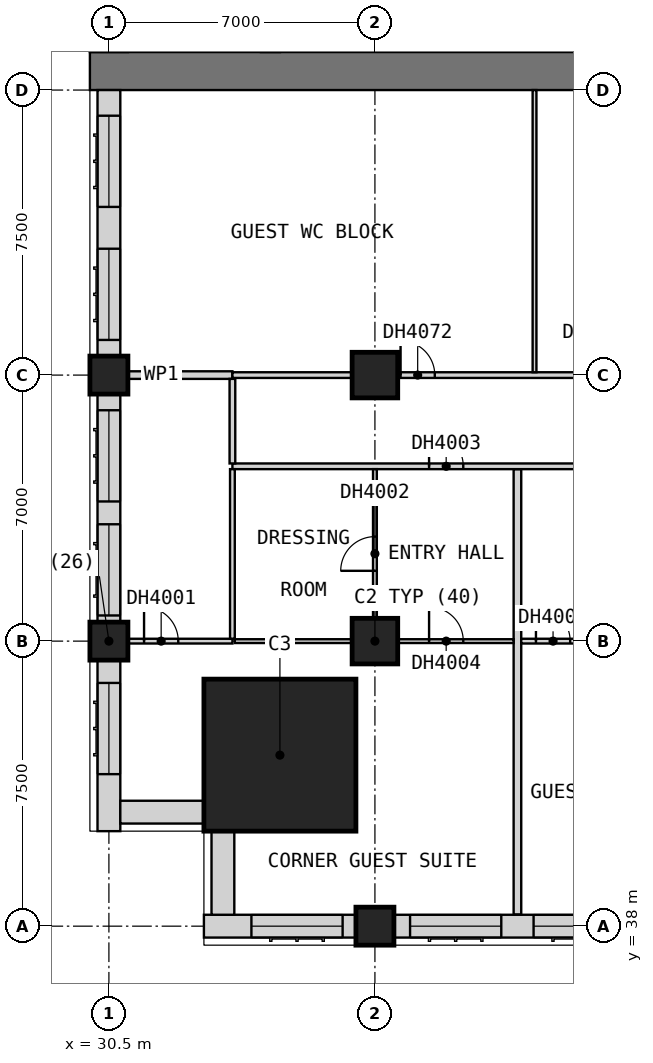
"""IFC4 building model, lengths in metres.
Left out: names, types, materials, properties, quantities, classifications, styles, units other than length and angle.
Written with IfcOpenShell. Run it as: python <this file> out.ifc"""

import sys

from ifc_helpers import new_model, si_unit, direction, frame, frame_2d, origin, origin_2d, place, context, subcontext, project, spatial, rectangle, extrude, element, fill, save


model = new_model("IFC4")
c1 = context("Model", 3, precision=1e-05, world=origin(), true_north=direction((0.0, 1.0)))
c2 = subcontext(c1, "Body", "Model", "MODEL_VIEW")
j1 = project(units=[si_unit("LENGTHUNIT", "METRE"), si_unit("PLANEANGLEUNIT", "RADIAN")], contexts=[c1])
p1 = place(None, origin())
s1 = spatial("IfcSite", under=j1, at=p1, CompositionType="ELEMENT")
p2 = place(p1, origin())
s2 = spatial("IfcBuilding", under=s1, at=p2, CompositionType="ELEMENT")
p3 = place(p2, frame((0.0, 0.0, 44.8)))
s3 = spatial("IfcBuildingStorey", under=s2, at=p3, CompositionType="ELEMENT", Elevation=44.8)
for number, where, z_axis, x_axis in (
    (1, (30.5, 45.5, 0.0), (0.0, 0.0, 1.0), (1.0, 0.0, 0.0)),
    (2, (30.5, 52.5, 0.0), (0.0, 0.0, 1.0), (1.0, 0.0, 0.0)),
    (3, (37.5, 38.0, 0.0), (0.0, 0.0, 1.0), (1.0, 0.0, 0.0)),
):
    element("IfcColumn", number, at=place(p3, frame(where, z_axis=z_axis, x_axis=x_axis)), inside=s3, PredefinedType="COLUMN", context=c2, shape_type="SweptSolid", body=[
        extrude(rectangle(XDim=1.0, YDim=1.0, at=origin_2d()), origin(), (0.0, 0.0, 1.0), 3.6),
    ])
for number, where, z_axis, x_axis in (
    (4, (37.5, 45.5, 0.0), (0.0, 0.0, 1.0), (1.0, 0.0, 0.0)),
    (5, (37.5, 52.5, 0.0), (0.0, 0.0, 1.0), (1.0, 0.0, 0.0)),
):
    element("IfcColumn", number, at=place(p3, frame(where, z_axis=z_axis, x_axis=x_axis)), inside=s3, PredefinedType="COLUMN", context=c2, shape_type="SweptSolid", body=[
        extrude(rectangle(XDim=1.2, YDim=1.2, at=origin_2d()), origin(), (0.0, 0.0, 1.0), 3.6),
    ])
p4 = place(p3, frame((35.0, 42.5, 0.0), z_axis=(0.0, 0.0, 1.0), x_axis=(1.0, 0.0, 0.0)))
e6 = element("IfcColumn", 6, at=p4, inside=s3, PredefinedType="COLUMN", context=c2, shape_type="SweptSolid", body=[
    extrude(rectangle(XDim=4.0, YDim=4.0, at=origin_2d()), origin(), (0.0, 0.0, 1.0), 3.6),
])
p5 = place(p3, frame((30.0, 60.5, 0.0), z_axis=(0.0, 0.0, 1.0), x_axis=(1.0, 0.0, 0.0)))
e7 = element("IfcWall", 7, at=p5, inside=s3, PredefinedType="SHEAR", context=c2, shape_type="SweptSolid", body=[
    extrude(rectangle(XDim=30.0, YDim=1.0, at=frame_2d((15.0, 0.0))), origin(), (0.0, 0.0, 1.0), 3.6),
])
p6 = place(p5, frame((21.9, 0.0, 0.0)))
e8 = element("IfcOpeningElement", 8, at=p6, cuts=e7, PredefinedType="OPENING", context=c2, shape_type="SweptSolid", body=[
    extrude(rectangle(XDim=1.8, YDim=2.1, at=frame_2d((0.9, 1.05))), frame((0.0, 0.51, 0.0), z_axis=(0.0, -1.0, 0.0), x_axis=(1.0, 0.0, 0.0)), (0.0, 0.0, 1.0), 1.02),
])
p7 = place(p5, frame((26.5, 0.0, 0.0)))
e9 = element("IfcOpeningElement", 9, at=p7, cuts=e7, PredefinedType="OPENING", context=c2, shape_type="SweptSolid", body=[
    extrude(rectangle(XDim=1.2, YDim=2.1, at=frame_2d((0.6, 1.05))), frame((0.0, 0.51, 0.0), z_axis=(0.0, -1.0, 0.0), x_axis=(1.0, 0.0, 0.0)), (0.0, 0.0, 1.0), 1.02),
])
p8 = place(p3, frame((33.0, 38.0, 0.0), z_axis=(0.0, 0.0, 1.0), x_axis=(1.0, 0.0, 0.0)))
e10 = element("IfcWall", 10, at=p8, inside=s3, PredefinedType="SOLIDWALL", context=c2, shape_type="SweptSolid", body=[
    extrude(rectangle(XDim=4.0, YDim=0.6, at=frame_2d((2.0, 0.0))), origin(), (0.0, 0.0, 1.0), 3.35),
])
p9 = place(p8, frame((1.25, 0.0, 0.8)))
e11 = element("IfcOpeningElement", 11, at=p9, cuts=e10, PredefinedType="OPENING", context=c2, shape_type="SweptSolid", body=[
    extrude(rectangle(XDim=2.4, YDim=1.8, at=frame_2d((1.2, 0.9))), frame((0.0, 0.31, 0.0), z_axis=(0.0, -1.0, 0.0), x_axis=(1.0, 0.0, 0.0)), (0.0, 0.0, 1.0), 0.62),
])
p10 = place(p3, frame((38.0, 38.0, 0.0), z_axis=(0.0, 0.0, 1.0), x_axis=(1.0, 0.0, 0.0)))
e12 = element("IfcWall", 12, at=p10, inside=s3, PredefinedType="SOLIDWALL", context=c2, shape_type="SweptSolid", body=[
    extrude(rectangle(XDim=6.5, YDim=0.6, at=frame_2d((3.25, 0.0))), origin(), (0.0, 0.0, 1.0), 2.85),
])
p11 = place(p10, frame((0.425, 0.0, 0.8)))
e13 = element("IfcOpeningElement", 13, at=p11, cuts=e12, PredefinedType="OPENING", context=c2, shape_type="SweptSolid", body=[
    extrude(rectangle(XDim=2.4, YDim=1.8, at=frame_2d((1.2, 0.9))), frame((0.0, 0.31, 0.0), z_axis=(0.0, -1.0, 0.0), x_axis=(1.0, 0.0, 0.0)), (0.0, 0.0, 1.0), 0.62),
])
p12 = place(p10, frame((3.675, 0.0, 0.8)))
e14 = element("IfcOpeningElement", 14, at=p12, cuts=e12, PredefinedType="OPENING", context=c2, shape_type="SweptSolid", body=[
    extrude(rectangle(XDim=2.4, YDim=1.8, at=frame_2d((1.2, 0.9))), frame((0.0, 0.31, 0.0), z_axis=(0.0, -1.0, 0.0), x_axis=(1.0, 0.0, 0.0)), (0.0, 0.0, 1.0), 0.62),
])
p13 = place(p3, frame((30.5, 60.0, 0.0), z_axis=(0.0, 0.0, 1.0), x_axis=(0.0, -1.0, 0.0)))
e15 = element("IfcWall", 15, at=p13, inside=s3, PredefinedType="SOLIDWALL", context=c2, shape_type="SweptSolid", body=[
    extrude(rectangle(XDim=7.0, YDim=0.6, at=frame_2d((3.5, 0.0))), origin(), (0.0, 0.0, 1.0), 3.35),
])
p14 = place(p13, frame((4.175, 0.0, 0.8)))
e16 = element("IfcOpeningElement", 16, at=p14, cuts=e15, PredefinedType="OPENING", context=c2, shape_type="SweptSolid", body=[
    extrude(rectangle(XDim=2.4, YDim=1.8, at=frame_2d((1.2, 0.9))), frame((0.0, 0.31, 0.0), z_axis=(0.0, -1.0, 0.0), x_axis=(1.0, 0.0, 0.0)), (0.0, 0.0, 1.0), 0.62),
])
p15 = place(p13, frame((0.675, 0.0, 0.8)))
e17 = element("IfcOpeningElement", 17, at=p15, cuts=e15, PredefinedType="OPENING", context=c2, shape_type="SweptSolid", body=[
    extrude(rectangle(XDim=2.4, YDim=1.8, at=frame_2d((1.2, 0.9))), frame((0.0, 0.31, 0.0), z_axis=(0.0, -1.0, 0.0), x_axis=(1.0, 0.0, 0.0)), (0.0, 0.0, 1.0), 0.62),
])
p16 = place(p3, frame((30.5, 52.0, 0.0), z_axis=(0.0, 0.0, 1.0), x_axis=(0.0, -1.0, 0.0)))
e18 = element("IfcWall", 18, at=p16, inside=s3, PredefinedType="SOLIDWALL", context=c2, shape_type="SweptSolid", body=[
    extrude(rectangle(XDim=6.0, YDim=0.6, at=frame_2d((3.0, 0.0))), origin(), (0.0, 0.0, 1.0), 2.85),
])
p17 = place(p16, frame((3.425, 0.0, 0.8)))
e19 = element("IfcOpeningElement", 19, at=p17, cuts=e18, PredefinedType="OPENING", context=c2, shape_type="SweptSolid", body=[
    extrude(rectangle(XDim=2.4, YDim=1.8, at=frame_2d((1.2, 0.9))), frame((0.0, 0.31, 0.0), z_axis=(0.0, -1.0, 0.0), x_axis=(1.0, 0.0, 0.0)), (0.0, 0.0, 1.0), 0.62),
])
p18 = place(p16, frame((0.425, 0.0, 0.8)))
e20 = element("IfcOpeningElement", 20, at=p18, cuts=e18, PredefinedType="OPENING", context=c2, shape_type="SweptSolid", body=[
    extrude(rectangle(XDim=2.4, YDim=1.8, at=frame_2d((1.2, 0.9))), frame((0.0, 0.31, 0.0), z_axis=(0.0, -1.0, 0.0), x_axis=(1.0, 0.0, 0.0)), (0.0, 0.0, 1.0), 0.62),
])
p19 = place(p3, frame((30.5, 45.0, 0.0), z_axis=(0.0, 0.0, 1.0), x_axis=(0.0, -1.0, 0.0)))
e21 = element("IfcWall", 21, at=p19, inside=s3, PredefinedType="SOLIDWALL", context=c2, shape_type="SweptSolid", body=[
    extrude(rectangle(XDim=4.5, YDim=0.6, at=frame_2d((2.25, 0.0))), origin(), (0.0, 0.0, 1.0), 3.35),
])
p20 = place(p19, frame((0.6, 0.0, 0.8)))
e22 = element("IfcOpeningElement", 22, at=p20, cuts=e21, PredefinedType="OPENING", context=c2, shape_type="SweptSolid", body=[
    extrude(rectangle(XDim=2.4, YDim=1.8, at=frame_2d((1.2, 0.9))), frame((0.0, 0.31, 0.0), z_axis=(0.0, -1.0, 0.0), x_axis=(1.0, 0.0, 0.0)), (0.0, 0.0, 1.0), 0.62),
])
for number, where, z_axis, x_axis in (
    (23, (30.8, 41.0, 0.0), (0.0, 0.0, 1.0), (1.0, 0.0, 0.0)),
    (24, (33.5, 40.5, 0.0), (0.0, 0.0, 1.0), (0.0, -1.0, 0.0)),
):
    element("IfcWall", number, at=place(p3, frame(where, z_axis=z_axis, x_axis=x_axis)), inside=s3, PredefinedType="SOLIDWALL", context=c2, shape_type="SweptSolid", body=[
        extrude(rectangle(XDim=2.2, YDim=0.6, at=frame_2d((1.1, 0.0))), origin(), (0.0, 0.0, 1.0), 3.35),
    ])
p21 = place(p3, frame((30.0, 52.5, 0.0), z_axis=(0.0, 0.0, 1.0), x_axis=(1.0, 0.0, 0.0)))
e25 = element("IfcWall", 25, at=p21, inside=s3, PredefinedType="PARTITIONING", context=c2, shape_type="SweptSolid", body=[
    extrude(rectangle(XDim=3.75, YDim=0.2, at=frame_2d((1.875, 0.0))), origin(), (0.0, 0.0, 1.0), 3.35),
])
p22 = place(p3, frame((41.25, 38.31, 0.0), z_axis=(0.0, 0.0, 1.0), x_axis=(0.0, 1.0, 0.0)))
e26 = element("IfcWall", 26, at=p22, inside=s3, PredefinedType="PARTITIONING", context=c2, shape_type="SweptSolid", body=[
    extrude(rectangle(XDim=11.715, YDim=0.2, at=frame_2d((5.857, 0.0))), origin(), (0.0, 0.0, 1.0), 3.35),
])
p23 = place(p3, frame((33.75, 50.1, 0.0), z_axis=(0.0, 0.0, 1.0), x_axis=(1.0, 0.0, 0.0)))
e27 = element("IfcWall", 27, at=p23, inside=s3, PredefinedType="PARTITIONING", context=c2, shape_type="SweptSolid", body=[
    extrude(rectangle(XDim=43.65, YDim=0.15, at=frame_2d((21.825, 0.0))), origin(), (0.0, 0.0, 1.0), 3.35),
])
p24 = place(p23, frame((5.175, 0.0, 0.0)))
e28 = element("IfcOpeningElement", 28, at=p24, cuts=e27, PredefinedType="OPENING", context=c2, shape_type="SweptSolid", body=[
    extrude(rectangle(XDim=0.9, YDim=2.1, at=frame_2d((0.45, 1.05))), frame((0.0, 0.085, 0.0), z_axis=(0.0, -1.0, 0.0), x_axis=(1.0, 0.0, 0.0)), (0.0, 0.0, 1.0), 0.17),
])
p25 = place(p23, frame((9.863, 0.0, 0.0)))
e29 = element("IfcOpeningElement", 29, at=p25, cuts=e27, PredefinedType="OPENING", context=c2, shape_type="SweptSolid", body=[
    extrude(rectangle(XDim=0.9, YDim=2.1, at=frame_2d((0.45, 1.05))), frame((0.0, 0.085, 0.0), z_axis=(0.0, -1.0, 0.0), x_axis=(1.0, 0.0, 0.0)), (0.0, 0.0, 1.0), 0.17),
])
p26 = place(p23, frame((16.938, 0.0, 0.0)))
e30 = element("IfcOpeningElement", 30, at=p26, cuts=e27, PredefinedType="OPENING", context=c2, shape_type="SweptSolid", body=[
    extrude(rectangle(XDim=1.0, YDim=2.1, at=frame_2d((0.5, 1.05))), frame((0.0, 0.085, 0.0), z_axis=(0.0, -1.0, 0.0), x_axis=(1.0, 0.0, 0.0)), (0.0, 0.0, 1.0), 0.17),
])
p27 = place(p23, frame((24.3, 0.0, 0.0)))
e31 = element("IfcOpeningElement", 31, at=p27, cuts=e27, PredefinedType="OPENING", context=c2, shape_type="SweptSolid", body=[
    extrude(rectangle(XDim=0.9, YDim=2.1, at=frame_2d((0.45, 1.05))), frame((0.0, 0.085, 0.0), z_axis=(0.0, -1.0, 0.0), x_axis=(1.0, 0.0, 0.0)), (0.0, 0.0, 1.0), 0.17),
])
p28 = place(p23, frame((31.938, 0.0, 0.0)))
e32 = element("IfcOpeningElement", 32, at=p28, cuts=e27, PredefinedType="OPENING", context=c2, shape_type="SweptSolid", body=[
    extrude(rectangle(XDim=1.0, YDim=2.1, at=frame_2d((0.5, 1.05))), frame((0.0, 0.085, 0.0), z_axis=(0.0, -1.0, 0.0), x_axis=(1.0, 0.0, 0.0)), (0.0, 0.0, 1.0), 0.17),
])
p29 = place(p23, frame((39.3, 0.0, 0.0)))
e33 = element("IfcOpeningElement", 33, at=p29, cuts=e27, PredefinedType="OPENING", context=c2, shape_type="SweptSolid", body=[
    extrude(rectangle(XDim=0.9, YDim=2.1, at=frame_2d((0.45, 1.05))), frame((0.0, 0.085, 0.0), z_axis=(0.0, -1.0, 0.0), x_axis=(1.0, 0.0, 0.0)), (0.0, 0.0, 1.0), 0.17),
])
p30 = place(p23, frame((42.0, 0.0, 0.0)))
e34 = element("IfcOpeningElement", 34, at=p30, cuts=e27, PredefinedType="OPENING", context=c2, shape_type="SweptSolid", body=[
    extrude(rectangle(XDim=0.9, YDim=2.1, at=frame_2d((0.45, 1.05))), frame((0.0, 0.085, 0.0), z_axis=(0.0, -1.0, 0.0), x_axis=(1.0, 0.0, 0.0)), (0.0, 0.0, 1.0), 0.17),
])
p31 = place(p3, frame((33.75, 52.5, 0.0), z_axis=(0.0, 0.0, 1.0), x_axis=(1.0, 0.0, 0.0)))
e35 = element("IfcWall", 35, at=p31, inside=s3, PredefinedType="PARTITIONING", context=c2, shape_type="SweptSolid", body=[
    extrude(rectangle(XDim=17.15, YDim=0.15, at=frame_2d((8.575, 0.0))), origin(), (0.0, 0.0, 1.0), 3.35),
])
p32 = place(p31, frame((4.425, 0.0, 0.0)))
e36 = element("IfcOpeningElement", 36, at=p32, cuts=e35, PredefinedType="OPENING", context=c2, shape_type="SweptSolid", body=[
    extrude(rectangle(XDim=0.9, YDim=2.1, at=frame_2d((0.45, 1.05))), frame((0.0, 0.085, 0.0), z_axis=(0.0, -1.0, 0.0), x_axis=(1.0, 0.0, 0.0)), (0.0, 0.0, 1.0), 0.17),
])
p33 = place(p31, frame((9.15, 0.0, 0.0)))
e37 = element("IfcOpeningElement", 37, at=p33, cuts=e35, PredefinedType="OPENING", context=c2, shape_type="SweptSolid", body=[
    extrude(rectangle(XDim=0.9, YDim=2.1, at=frame_2d((0.45, 1.05))), frame((0.0, 0.085, 0.0), z_axis=(0.0, -1.0, 0.0), x_axis=(1.0, 0.0, 0.0)), (0.0, 0.0, 1.0), 0.17),
])
p34 = place(p31, frame((12.675, 0.0, 0.0)))
e38 = element("IfcOpeningElement", 38, at=p34, cuts=e35, PredefinedType="OPENING", context=c2, shape_type="SweptSolid", body=[
    extrude(rectangle(XDim=0.9, YDim=2.1, at=frame_2d((0.45, 1.05))), frame((0.0, 0.085, 0.0), z_axis=(0.0, -1.0, 0.0), x_axis=(1.0, 0.0, 0.0)), (0.0, 0.0, 1.0), 0.17),
])
p35 = place(p31, frame((15.625, 0.0, 0.0)))
e39 = element("IfcOpeningElement", 39, at=p35, cuts=e35, PredefinedType="OPENING", context=c2, shape_type="SweptSolid", body=[
    extrude(rectangle(XDim=0.9, YDim=2.1, at=frame_2d((0.45, 1.05))), frame((0.0, 0.085, 0.0), z_axis=(0.0, -1.0, 0.0), x_axis=(1.0, 0.0, 0.0)), (0.0, 0.0, 1.0), 0.17),
])
p36 = place(p3, frame((33.75, 50.175, 0.0), z_axis=(0.0, 0.0, 1.0), x_axis=(0.0, 1.0, 0.0)))
e40 = element("IfcWall", 40, at=p36, inside=s3, PredefinedType="PARTITIONING", context=c2, shape_type="SweptSolid", body=[
    extrude(rectangle(XDim=2.225, YDim=0.15, at=frame_2d((1.112, 0.0))), origin(), (0.0, 0.0, 1.0), 3.35),
])
p37 = place(p3, frame((33.812, 45.5, 0.0), z_axis=(0.0, 0.0, 1.0), x_axis=(1.0, 0.0, 0.0)))
e41 = element("IfcWall", 41, at=p37, inside=s3, PredefinedType="PARTITIONING", context=c2, shape_type="SweptSolid", body=[
    extrude(rectangle(XDim=7.337, YDim=0.1, at=frame_2d((3.669, 0.0))), origin(), (0.0, 0.0, 1.0), 3.35),
])
p38 = place(p37, frame((5.113, 0.0, 0.0)))
e42 = element("IfcOpeningElement", 42, at=p38, cuts=e41, PredefinedType="OPENING", context=c2, shape_type="SweptSolid", body=[
    extrude(rectangle(XDim=0.9, YDim=2.1, at=frame_2d((0.45, 1.05))), frame((0.0, 0.06, 0.0), z_axis=(0.0, -1.0, 0.0), x_axis=(1.0, 0.0, 0.0)), (0.0, 0.0, 1.0), 0.12),
])
p39 = place(p3, frame((37.5, 45.55, 0.0), z_axis=(0.0, 0.0, 1.0), x_axis=(0.0, 1.0, 0.0)))
e43 = element("IfcWall", 43, at=p39, inside=s3, PredefinedType="PARTITIONING", context=c2, shape_type="SweptSolid", body=[
    extrude(rectangle(XDim=4.475, YDim=0.1, at=frame_2d((2.237, 0.0))), origin(), (0.0, 0.0, 1.0), 3.35),
])
p40 = place(p39, frame((1.8, 0.0, 0.0)))
e44 = element("IfcOpeningElement", 44, at=p40, cuts=e43, PredefinedType="OPENING", context=c2, shape_type="SweptSolid", body=[
    extrude(rectangle(XDim=0.9, YDim=2.1, at=frame_2d((0.45, 1.05))), frame((0.0, 0.06, 0.0), z_axis=(0.0, -1.0, 0.0), x_axis=(1.0, 0.0, 0.0)), (0.0, 0.0, 1.0), 0.12),
])
p41 = place(p3, frame((41.7, 52.575, 0.0), z_axis=(0.0, 0.0, 1.0), x_axis=(0.0, 1.0, 0.0)))
e45 = element("IfcWall", 45, at=p41, inside=s3, PredefinedType="PARTITIONING", context=c2, shape_type="SweptSolid", body=[
    extrude(rectangle(XDim=7.425, YDim=0.1, at=frame_2d((3.712, 0.0))), origin(), (0.0, 0.0, 1.0), 3.35),
])
p42 = place(p3, frame((30.0, 45.5, 0.0), z_axis=(0.0, 0.0, 1.0), x_axis=(1.0, 0.0, 0.0)))
e46 = element("IfcWall", 46, at=p42, inside=s3, PredefinedType="PARTITIONING", context=c2, shape_type="SweptSolid", body=[
    extrude(rectangle(XDim=3.75, YDim=0.125, at=frame_2d((1.875, 0.0))), origin(), (0.0, 0.0, 1.0), 3.35),
])
p43 = place(p42, frame((1.425, 0.0, 0.0)))
e47 = element("IfcOpeningElement", 47, at=p43, cuts=e46, PredefinedType="OPENING", context=c2, shape_type="SweptSolid", body=[
    extrude(rectangle(XDim=0.9, YDim=2.1, at=frame_2d((0.45, 1.05))), frame((0.0, 0.073, 0.0), z_axis=(0.0, -1.0, 0.0), x_axis=(1.0, 0.0, 0.0)), (0.0, 0.0, 1.0), 0.145),
])
p44 = place(p3, frame((41.35, 45.5, 0.0), z_axis=(0.0, 0.0, 1.0), x_axis=(1.0, 0.0, 0.0)))
e48 = element("IfcWall", 48, at=p44, inside=s3, PredefinedType="PARTITIONING", context=c2, shape_type="SweptSolid", body=[
    extrude(rectangle(XDim=1.775, YDim=0.125, at=frame_2d((0.887, 0.0))), origin(), (0.0, 0.0, 1.0), 3.35),
])
p45 = place(p44, frame((0.387, 0.0, 0.0)))
e49 = element("IfcOpeningElement", 49, at=p45, cuts=e48, PredefinedType="OPENING", context=c2, shape_type="SweptSolid", body=[
    extrude(rectangle(XDim=0.9, YDim=2.1, at=frame_2d((0.45, 1.05))), frame((0.0, 0.073, 0.0), z_axis=(0.0, -1.0, 0.0), x_axis=(1.0, 0.0, 0.0)), (0.0, 0.0, 1.0), 0.145),
])
p46 = place(p3, frame((33.75, 45.562, 0.0), z_axis=(0.0, 0.0, 1.0), x_axis=(0.0, 1.0, 0.0)))
e50 = element("IfcWall", 50, at=p46, inside=s3, PredefinedType="PARTITIONING", context=c2, shape_type="SweptSolid", body=[
    extrude(rectangle(XDim=4.462, YDim=0.125, at=frame_2d((2.231, 0.0))), origin(), (0.0, 0.0, 1.0), 3.35),
])
p47 = place(p9, origin())
e51 = element("IfcWindow", 51, at=p47, inside=s3, PartitioningType="SINGLE_PANEL", PredefinedType="WINDOW", context=c2, shape_type="SweptSolid", body=[
    extrude(rectangle(XDim=2.4, YDim=1.8, at=frame_2d((1.2, 0.9))), frame((0.0, -0.07, 0.0), z_axis=(0.0, -1.0, 0.0), x_axis=(1.0, 0.0, 0.0)), (0.0, 0.0, 1.0), 0.06),
])
fill(e11, e51)
p48 = place(p11, origin())
e52 = element("IfcWindow", 52, at=p48, inside=s3, PartitioningType="SINGLE_PANEL", PredefinedType="WINDOW", context=c2, shape_type="SweptSolid", body=[
    extrude(rectangle(XDim=2.4, YDim=1.8, at=frame_2d((1.2, 0.9))), frame((0.0, -0.07, 0.0), z_axis=(0.0, -1.0, 0.0), x_axis=(1.0, 0.0, 0.0)), (0.0, 0.0, 1.0), 0.06),
])
fill(e13, e52)
p49 = place(p12, origin())
e53 = element("IfcWindow", 53, at=p49, inside=s3, PartitioningType="SINGLE_PANEL", PredefinedType="WINDOW", context=c2, shape_type="SweptSolid", body=[
    extrude(rectangle(XDim=2.4, YDim=1.8, at=frame_2d((1.2, 0.9))), frame((0.0, -0.07, 0.0), z_axis=(0.0, -1.0, 0.0), x_axis=(1.0, 0.0, 0.0)), (0.0, 0.0, 1.0), 0.06),
])
fill(e14, e53)
p50 = place(p14, origin())
e54 = element("IfcWindow", 54, at=p50, inside=s3, PartitioningType="SINGLE_PANEL", PredefinedType="WINDOW", context=c2, shape_type="SweptSolid", body=[
    extrude(rectangle(XDim=2.4, YDim=1.8, at=frame_2d((1.2, 0.9))), frame((0.0, -0.07, 0.0), z_axis=(0.0, -1.0, 0.0), x_axis=(1.0, 0.0, 0.0)), (0.0, 0.0, 1.0), 0.06),
])
fill(e16, e54)
p51 = place(p15, origin())
e55 = element("IfcWindow", 55, at=p51, inside=s3, PartitioningType="SINGLE_PANEL", PredefinedType="WINDOW", context=c2, shape_type="SweptSolid", body=[
    extrude(rectangle(XDim=2.4, YDim=1.8, at=frame_2d((1.2, 0.9))), frame((0.0, -0.07, 0.0), z_axis=(0.0, -1.0, 0.0), x_axis=(1.0, 0.0, 0.0)), (0.0, 0.0, 1.0), 0.06),
])
fill(e17, e55)
p52 = place(p17, origin())
e56 = element("IfcWindow", 56, at=p52, inside=s3, PartitioningType="SINGLE_PANEL", PredefinedType="WINDOW", context=c2, shape_type="SweptSolid", body=[
    extrude(rectangle(XDim=2.4, YDim=1.8, at=frame_2d((1.2, 0.9))), frame((0.0, -0.07, 0.0), z_axis=(0.0, -1.0, 0.0), x_axis=(1.0, 0.0, 0.0)), (0.0, 0.0, 1.0), 0.06),
])
fill(e19, e56)
p53 = place(p18, origin())
e57 = element("IfcWindow", 57, at=p53, inside=s3, PartitioningType="SINGLE_PANEL", PredefinedType="WINDOW", context=c2, shape_type="SweptSolid", body=[
    extrude(rectangle(XDim=2.4, YDim=1.8, at=frame_2d((1.2, 0.9))), frame((0.0, -0.07, 0.0), z_axis=(0.0, -1.0, 0.0), x_axis=(1.0, 0.0, 0.0)), (0.0, 0.0, 1.0), 0.06),
])
fill(e20, e57)
p54 = place(p20, origin())
e58 = element("IfcWindow", 58, at=p54, inside=s3, PartitioningType="SINGLE_PANEL", PredefinedType="WINDOW", context=c2, shape_type="SweptSolid", body=[
    extrude(rectangle(XDim=2.4, YDim=1.8, at=frame_2d((1.2, 0.9))), frame((0.0, -0.07, 0.0), z_axis=(0.0, -1.0, 0.0), x_axis=(1.0, 0.0, 0.0)), (0.0, 0.0, 1.0), 0.06),
])
fill(e22, e58)
p55 = place(p43, origin())
e59 = element("IfcDoor", 59, at=p55, inside=s3, OperationType="SINGLE_SWING_LEFT", PredefinedType="DOOR", context=c2, shape_type="SweptSolid", body=[
    extrude(rectangle(XDim=0.9, YDim=2.1, at=frame_2d((0.45, 1.05))), frame((0.0, 0.025, 0.0), z_axis=(0.0, -1.0, 0.0), x_axis=(1.0, 0.0, 0.0)), (0.0, 0.0, 1.0), 0.05),
])
fill(e47, e59)
p56 = place(p40, origin())
e60 = element("IfcDoor", 60, at=p56, inside=s3, OperationType="SINGLE_SWING_RIGHT", PredefinedType="DOOR", context=c2, shape_type="SweptSolid", body=[
    extrude(rectangle(XDim=0.9, YDim=2.1, at=frame_2d((0.45, 1.05))), frame((0.0, 0.025, 0.0), z_axis=(0.0, -1.0, 0.0), x_axis=(1.0, 0.0, 0.0)), (0.0, 0.0, 1.0), 0.05),
])
fill(e44, e60)
p57 = place(p24, origin())
e61 = element("IfcDoor", 61, at=p57, inside=s3, OperationType="SINGLE_SWING_RIGHT", PredefinedType="DOOR", context=c2, shape_type="SweptSolid", body=[
    extrude(rectangle(XDim=0.9, YDim=2.1, at=frame_2d((0.45, 1.05))), frame((0.0, 0.025, 0.0), z_axis=(0.0, -1.0, 0.0), x_axis=(1.0, 0.0, 0.0)), (0.0, 0.0, 1.0), 0.05),
])
fill(e28, e61)
p58 = place(p38, origin())
e62 = element("IfcDoor", 62, at=p58, inside=s3, OperationType="SINGLE_SWING_LEFT", PredefinedType="DOOR", context=c2, shape_type="SweptSolid", body=[
    extrude(rectangle(XDim=0.9, YDim=2.1, at=frame_2d((0.45, 1.05))), frame((0.0, 0.025, 0.0), z_axis=(0.0, -1.0, 0.0), x_axis=(1.0, 0.0, 0.0)), (0.0, 0.0, 1.0), 0.05),
])
fill(e42, e62)
p59 = place(p45, origin())
e63 = element("IfcDoor", 63, at=p59, inside=s3, OperationType="SINGLE_SWING_LEFT", PredefinedType="DOOR", context=c2, shape_type="SweptSolid", body=[
    extrude(rectangle(XDim=0.9, YDim=2.1, at=frame_2d((0.45, 1.05))), frame((0.0, 0.025, 0.0), z_axis=(0.0, -1.0, 0.0), x_axis=(1.0, 0.0, 0.0)), (0.0, 0.0, 1.0), 0.05),
])
fill(e49, e63)
p60 = place(p32, origin())
e64 = element("IfcDoor", 64, at=p60, inside=s3, OperationType="SINGLE_SWING_RIGHT", PredefinedType="DOOR", context=c2, shape_type="SweptSolid", body=[
    extrude(rectangle(XDim=0.9, YDim=2.1, at=frame_2d((0.45, 1.05))), frame((0.0, 0.025, 0.0), z_axis=(0.0, -1.0, 0.0), x_axis=(1.0, 0.0, 0.0)), (0.0, 0.0, 1.0), 0.05),
])
fill(e36, e64)
save(model, sys.argv[1])
